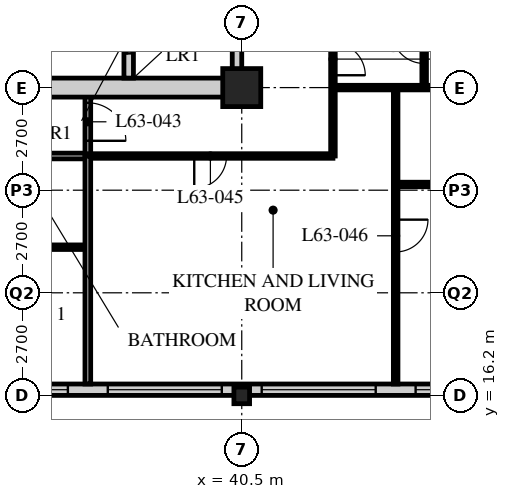
"""IFC4 building model, lengths in metres.
Left out: names, types, materials, properties, quantities, classifications, styles, units other than length and angle.
Written with IfcOpenShell. Run it as: python <this file> out.ifc"""

import sys

from ifc_helpers import new_model, si_unit, direction, frame, frame_2d, origin, origin_2d, place, context, subcontext, project, spatial, rectangle, hollow_rectangle, i_section, extrude, element, fill, save


model = new_model("IFC4")
c1 = context("Model", 3, precision=1e-05, world=origin(), true_north=direction((0.0, 1.0)))
c2 = subcontext(c1, "Body", "Model", "MODEL_VIEW")
j1 = project(units=[si_unit("LENGTHUNIT", "METRE"), si_unit("PLANEANGLEUNIT", "RADIAN")], contexts=[c1])
p1 = place(None, origin())
s1 = spatial("IfcSite", under=j1, at=p1, CompositionType="ELEMENT")
p2 = place(p1, origin())
s2 = spatial("IfcBuilding", under=s1, at=p2, CompositionType="ELEMENT")
p3 = place(p2, frame((0.0, 0.0, 246.3)))
s3 = spatial("IfcBuildingStorey", under=s2, at=p3, CompositionType="ELEMENT", Elevation=246.3)
p4 = place(p3, frame((40.5, 16.2, 0.0), z_axis=(0.0, 0.0, 1.0), x_axis=(1.0, 0.0, 0.0)))
e1 = element("IfcColumn", 1, at=p4, inside=s3, PredefinedType="COLUMN", context=c2, shape_type="SweptSolid", body=[
    extrude(i_section(OverallWidth=0.412, OverallDepth=0.437, WebThickness=0.036, FlangeThickness=0.058, FilletRadius=0.015, at=origin_2d()), origin(), (0.0, 0.0, 1.0), 3.9),
])
p5 = place(p3, frame((40.5, 24.3, 0.0), z_axis=(0.0, 0.0, 1.0), x_axis=(1.0, 0.0, 0.0)))
e2 = element("IfcColumn", 2, at=p5, inside=s3, PredefinedType="COLUMN", context=c2, shape_type="SweptSolid", body=[
    extrude(hollow_rectangle(XDim=1.0, YDim=1.0, WallThickness=0.1, at=origin_2d()), origin(), (0.0, 0.0, 1.0), 3.9),
])
p6 = place(p3, frame((8.4, 16.35, 0.0), z_axis=(0.0, 0.0, 1.0), x_axis=(1.0, 0.0, 0.0)))
e3 = element("IfcWall", 3, at=p6, inside=s3, PredefinedType="SOLIDWALL", context=c2, shape_type="SweptSolid", body=[
    extrude(rectangle(XDim=40.2, YDim=0.3, at=frame_2d((20.1, 0.0))), origin(), (0.0, 0.0, 1.0), 3.69),
])
p7 = place(p6, frame((0.225, 0.0, 0.6)))
e4 = element("IfcOpeningElement", 4, at=p7, cuts=e3, PredefinedType="OPENING", context=c2, shape_type="SweptSolid", body=[
    extrude(rectangle(XDim=3.0, YDim=2.4, at=frame_2d((1.5, 1.2))), frame((0.0, 0.16, 0.0), z_axis=(0.0, -1.0, 0.0), x_axis=(1.0, 0.0, 0.0)), (0.0, 0.0, 1.0), 0.32),
])
p8 = place(p6, frame((4.275, 0.0, 0.6)))
e5 = element("IfcOpeningElement", 5, at=p8, cuts=e3, PredefinedType="OPENING", context=c2, shape_type="SweptSolid", body=[
    extrude(rectangle(XDim=3.0, YDim=2.4, at=frame_2d((1.5, 1.2))), frame((0.0, 0.16, 0.0), z_axis=(0.0, -1.0, 0.0), x_axis=(1.0, 0.0, 0.0)), (0.0, 0.0, 1.0), 0.32),
])
p9 = place(p6, frame((8.325, 0.0, 0.6)))
e6 = element("IfcOpeningElement", 6, at=p9, cuts=e3, PredefinedType="OPENING", context=c2, shape_type="SweptSolid", body=[
    extrude(rectangle(XDim=3.0, YDim=2.4, at=frame_2d((1.5, 1.2))), frame((0.0, 0.16, 0.0), z_axis=(0.0, -1.0, 0.0), x_axis=(1.0, 0.0, 0.0)), (0.0, 0.0, 1.0), 0.32),
])
p10 = place(p6, frame((12.375, 0.0, 0.6)))
e7 = element("IfcOpeningElement", 7, at=p10, cuts=e3, PredefinedType="OPENING", context=c2, shape_type="SweptSolid", body=[
    extrude(rectangle(XDim=3.0, YDim=2.4, at=frame_2d((1.5, 1.2))), frame((0.0, 0.16, 0.0), z_axis=(0.0, -1.0, 0.0), x_axis=(1.0, 0.0, 0.0)), (0.0, 0.0, 1.0), 0.32),
])
p11 = place(p6, frame((16.425, 0.0, 0.6)))
e8 = element("IfcOpeningElement", 8, at=p11, cuts=e3, PredefinedType="OPENING", context=c2, shape_type="SweptSolid", body=[
    extrude(rectangle(XDim=3.0, YDim=2.4, at=frame_2d((1.5, 1.2))), frame((0.0, 0.16, 0.0), z_axis=(0.0, -1.0, 0.0), x_axis=(1.0, 0.0, 0.0)), (0.0, 0.0, 1.0), 0.32),
])
p12 = place(p6, frame((20.475, 0.0, 0.6)))
e9 = element("IfcOpeningElement", 9, at=p12, cuts=e3, PredefinedType="OPENING", context=c2, shape_type="SweptSolid", body=[
    extrude(rectangle(XDim=3.0, YDim=2.4, at=frame_2d((1.5, 1.2))), frame((0.0, 0.16, 0.0), z_axis=(0.0, -1.0, 0.0), x_axis=(1.0, 0.0, 0.0)), (0.0, 0.0, 1.0), 0.32),
])
p13 = place(p6, frame((24.525, 0.0, 0.6)))
e10 = element("IfcOpeningElement", 10, at=p13, cuts=e3, PredefinedType="OPENING", context=c2, shape_type="SweptSolid", body=[
    extrude(rectangle(XDim=3.0, YDim=2.4, at=frame_2d((1.5, 1.2))), frame((0.0, 0.16, 0.0), z_axis=(0.0, -1.0, 0.0), x_axis=(1.0, 0.0, 0.0)), (0.0, 0.0, 1.0), 0.32),
])
p14 = place(p6, frame((28.575, 0.0, 0.6)))
e11 = element("IfcOpeningElement", 11, at=p14, cuts=e3, PredefinedType="OPENING", context=c2, shape_type="SweptSolid", body=[
    extrude(rectangle(XDim=3.0, YDim=2.4, at=frame_2d((1.5, 1.2))), frame((0.0, 0.16, 0.0), z_axis=(0.0, -1.0, 0.0), x_axis=(1.0, 0.0, 0.0)), (0.0, 0.0, 1.0), 0.32),
])
p15 = place(p6, frame((32.625, 0.0, 0.6)))
e12 = element("IfcOpeningElement", 12, at=p15, cuts=e3, PredefinedType="OPENING", context=c2, shape_type="SweptSolid", body=[
    extrude(rectangle(XDim=3.0, YDim=2.4, at=frame_2d((1.5, 1.2))), frame((0.0, 0.16, 0.0), z_axis=(0.0, -1.0, 0.0), x_axis=(1.0, 0.0, 0.0)), (0.0, 0.0, 1.0), 0.32),
])
p16 = place(p6, frame((36.675, 0.0, 0.6)))
e13 = element("IfcOpeningElement", 13, at=p16, cuts=e3, PredefinedType="OPENING", context=c2, shape_type="SweptSolid", body=[
    extrude(rectangle(XDim=3.0, YDim=2.4, at=frame_2d((1.5, 1.2))), frame((0.0, 0.16, 0.0), z_axis=(0.0, -1.0, 0.0), x_axis=(1.0, 0.0, 0.0)), (0.0, 0.0, 1.0), 0.32),
])
p17 = place(p3, frame((12.15, 22.5, 0.0), z_axis=(0.0, 0.0, 1.0), x_axis=(1.0, 0.0, 0.0)))
e14 = element("IfcWall", 14, at=p17, inside=s3, PredefinedType="PARTITIONING", context=c2, shape_type="SweptSolid", body=[
    extrude(rectangle(XDim=24.3, YDim=0.15, at=frame_2d((12.15, 0.0))), origin(), (0.0, 0.0, 1.0), 3.69),
])
p18 = place(p17, frame((6.4, 0.0, 0.0)))
e15 = element("IfcOpeningElement", 15, at=p18, cuts=e14, PredefinedType="OPENING", context=c2, shape_type="SweptSolid", body=[
    extrude(rectangle(XDim=1.0, YDim=2.1, at=frame_2d((0.5, 1.05))), frame((0.0, 0.085, 0.0), z_axis=(0.0, -1.0, 0.0), x_axis=(1.0, 0.0, 0.0)), (0.0, 0.0, 1.0), 0.17),
])
p19 = place(p17, frame((8.5, 0.0, 0.0)))
e16 = element("IfcOpeningElement", 16, at=p19, cuts=e14, PredefinedType="OPENING", context=c2, shape_type="SweptSolid", body=[
    extrude(rectangle(XDim=1.0, YDim=2.1, at=frame_2d((0.5, 1.05))), frame((0.0, 0.085, 0.0), z_axis=(0.0, -1.0, 0.0), x_axis=(1.0, 0.0, 0.0)), (0.0, 0.0, 1.0), 0.17),
])
p20 = place(p17, frame((16.6, 0.0, 0.0)))
e17 = element("IfcOpeningElement", 17, at=p20, cuts=e14, PredefinedType="OPENING", context=c2, shape_type="SweptSolid", body=[
    extrude(rectangle(XDim=1.0, YDim=2.1, at=frame_2d((0.5, 1.05))), frame((0.0, 0.085, 0.0), z_axis=(0.0, -1.0, 0.0), x_axis=(1.0, 0.0, 0.0)), (0.0, 0.0, 1.0), 0.17),
])
p21 = place(p17, frame((2.625, 0.0, 0.0)))
e18 = element("IfcOpeningElement", 18, at=p21, cuts=e14, PredefinedType="OPENING", context=c2, shape_type="SweptSolid", body=[
    extrude(rectangle(XDim=1.0, YDim=2.1, at=frame_2d((0.5, 1.05))), frame((0.0, 0.085, 0.0), z_axis=(0.0, -1.0, 0.0), x_axis=(1.0, 0.0, 0.0)), (0.0, 0.0, 1.0), 0.17),
])
p22 = place(p3, frame((36.45, 22.5, 0.0), z_axis=(0.0, 0.0, 1.0), x_axis=(0.0, 1.0, 0.0)))
e19 = element("IfcWall", 19, at=p22, inside=s3, PredefinedType="PARTITIONING", context=c2, shape_type="SweptSolid", body=[
    extrude(rectangle(XDim=1.8, YDim=0.15, at=frame_2d((0.9, 0.0))), origin(), (0.0, 0.0, 1.0), 3.69),
])
p23 = place(p22, frame((0.4, 0.0, 0.0)))
e20 = element("IfcOpeningElement", 20, at=p23, cuts=e19, PredefinedType="OPENING", context=c2, shape_type="SweptSolid", body=[
    extrude(rectangle(XDim=1.0, YDim=2.1, at=frame_2d((0.5, 1.05))), frame((0.0, 0.085, 0.0), z_axis=(0.0, -1.0, 0.0), x_axis=(1.0, 0.0, 0.0)), (0.0, 0.0, 1.0), 0.17),
])
p24 = place(p3, frame((20.25, 20.1, 0.0), z_axis=(0.0, 0.0, 1.0), x_axis=(1.0, 0.0, 0.0)))
e21 = element("IfcWall", 21, at=p24, inside=s3, PredefinedType="PARTITIONING", context=c2, shape_type="SweptSolid", body=[
    extrude(rectangle(XDim=16.2, YDim=0.12, at=frame_2d((8.1, 0.0))), origin(), (0.0, 0.0, 1.0), 3.69),
])
p25 = place(p24, frame((0.975, 0.0, 0.0)))
e22 = element("IfcOpeningElement", 22, at=p25, cuts=e21, PredefinedType="OPENING", context=c2, shape_type="SweptSolid", body=[
    extrude(rectangle(XDim=0.85, YDim=2.1, at=frame_2d((0.425, 1.05))), frame((0.0, 0.07, 0.0), z_axis=(0.0, -1.0, 0.0), x_axis=(1.0, 0.0, 0.0)), (0.0, 0.0, 1.0), 0.14),
])
p26 = place(p24, frame((4.375, 0.0, 0.0)))
e23 = element("IfcOpeningElement", 23, at=p26, cuts=e21, PredefinedType="OPENING", context=c2, shape_type="SweptSolid", body=[
    extrude(rectangle(XDim=0.85, YDim=2.1, at=frame_2d((0.425, 1.05))), frame((0.0, 0.07, 0.0), z_axis=(0.0, -1.0, 0.0), x_axis=(1.0, 0.0, 0.0)), (0.0, 0.0, 1.0), 0.14),
])
p27 = place(p24, frame((9.075, 0.0, 0.0)))
e24 = element("IfcOpeningElement", 24, at=p27, cuts=e21, PredefinedType="OPENING", context=c2, shape_type="SweptSolid", body=[
    extrude(rectangle(XDim=0.85, YDim=2.1, at=frame_2d((0.425, 1.05))), frame((0.0, 0.07, 0.0), z_axis=(0.0, -1.0, 0.0), x_axis=(1.0, 0.0, 0.0)), (0.0, 0.0, 1.0), 0.14),
])
p28 = place(p24, frame((12.475, 0.0, 0.0)))
e25 = element("IfcOpeningElement", 25, at=p28, cuts=e21, PredefinedType="OPENING", context=c2, shape_type="SweptSolid", body=[
    extrude(rectangle(XDim=0.85, YDim=2.1, at=frame_2d((0.425, 1.05))), frame((0.0, 0.07, 0.0), z_axis=(0.0, -1.0, 0.0), x_axis=(1.0, 0.0, 0.0)), (0.0, 0.0, 1.0), 0.14),
])
p29 = place(p3, frame((42.9, 22.5, 0.0), z_axis=(0.0, 0.0, 1.0), x_axis=(0.0, 1.0, 0.0)))
e26 = element("IfcWall", 26, at=p29, inside=s3, PredefinedType="PARTITIONING", context=c2, shape_type="SweptSolid", body=[
    extrude(rectangle(XDim=13.95, YDim=0.12, at=frame_2d((6.975, 0.0))), origin(), (0.0, 0.0, 1.0), 3.69),
])
p30 = place(p29, frame((2.125, 0.0, 0.0)))
e27 = element("IfcOpeningElement", 27, at=p30, cuts=e26, PredefinedType="OPENING", context=c2, shape_type="SweptSolid", body=[
    extrude(rectangle(XDim=0.85, YDim=2.1, at=frame_2d((0.425, 1.05))), frame((0.0, 0.07, 0.0), z_axis=(0.0, -1.0, 0.0), x_axis=(1.0, 0.0, 0.0)), (0.0, 0.0, 1.0), 0.14),
])
p31 = place(p29, frame((6.175, 0.0, 0.0)))
e28 = element("IfcOpeningElement", 28, at=p31, cuts=e26, PredefinedType="OPENING", context=c2, shape_type="SweptSolid", body=[
    extrude(rectangle(XDim=0.85, YDim=2.1, at=frame_2d((0.425, 1.05))), frame((0.0, 0.07, 0.0), z_axis=(0.0, -1.0, 0.0), x_axis=(1.0, 0.0, 0.0)), (0.0, 0.0, 1.0), 0.14),
])
p32 = place(p29, frame((10.225, 0.0, 0.0)))
e29 = element("IfcOpeningElement", 29, at=p32, cuts=e26, PredefinedType="OPENING", context=c2, shape_type="SweptSolid", body=[
    extrude(rectangle(XDim=0.85, YDim=2.1, at=frame_2d((0.425, 1.05))), frame((0.0, 0.07, 0.0), z_axis=(0.0, -1.0, 0.0), x_axis=(1.0, 0.0, 0.0)), (0.0, 0.0, 1.0), 0.14),
])
p33 = place(p3, frame((36.45, 22.5, 0.0), z_axis=(0.0, 0.0, 1.0), x_axis=(1.0, 0.0, 0.0)))
e30 = element("IfcWall", 30, at=p33, inside=s3, PredefinedType="PARTITIONING", context=c2, shape_type="SweptSolid", body=[
    extrude(rectangle(XDim=6.45, YDim=0.12, at=frame_2d((3.225, 0.0))), origin(), (0.0, 0.0, 1.0), 3.69),
])
p34 = place(p33, frame((2.8, 0.0, 0.0)))
e31 = element("IfcOpeningElement", 31, at=p34, cuts=e30, PredefinedType="OPENING", context=c2, shape_type="SweptSolid", body=[
    extrude(rectangle(XDim=0.85, YDim=2.1, at=frame_2d((0.425, 1.05))), frame((0.0, 0.07, 0.0), z_axis=(0.0, -1.0, 0.0), x_axis=(1.0, 0.0, 0.0)), (0.0, 0.0, 1.0), 0.14),
])
p35 = place(p3, frame((42.9, 24.3, 0.0), z_axis=(0.0, 0.0, 1.0), x_axis=(1.0, 0.0, 0.0)))
e32 = element("IfcWall", 32, at=p35, inside=s3, PredefinedType="PARTITIONING", context=c2, shape_type="SweptSolid", body=[
    extrude(rectangle(XDim=9.45, YDim=0.12, at=frame_2d((4.725, 0.0))), origin(), (0.0, 0.0, 1.0), 3.078),
])
p36 = place(p3, frame((36.45, 16.5, 0.0), z_axis=(0.0, 0.0, 1.0), x_axis=(0.0, 1.0, 0.0)))
e33 = element("IfcWall", 33, at=p36, inside=s3, PredefinedType="PARTITIONING", context=c2, shape_type="SweptSolid", body=[
    extrude(rectangle(XDim=6.0, YDim=0.15, at=frame_2d((3.0, 0.0))), origin(), (0.0, 0.0, 1.0), 3.69),
])
p37 = place(p3, frame((44.55, 16.5, 0.0), z_axis=(0.0, 0.0, 1.0), x_axis=(0.0, 1.0, 0.0)))
e34 = element("IfcWall", 34, at=p37, inside=s3, PredefinedType="PARTITIONING", context=c2, shape_type="SweptSolid", body=[
    extrude(rectangle(XDim=7.8, YDim=0.12, at=frame_2d((3.9, 0.0))), origin(), (0.0, 0.0, 1.0), 3.69),
])
p38 = place(p37, frame((3.475, 0.0, 0.0)))
e35 = element("IfcOpeningElement", 35, at=p38, cuts=e34, PredefinedType="OPENING", context=c2, shape_type="SweptSolid", body=[
    extrude(rectangle(XDim=0.85, YDim=2.1, at=frame_2d((0.425, 1.05))), frame((0.0, 0.07, 0.0), z_axis=(0.0, -1.0, 0.0), x_axis=(1.0, 0.0, 0.0)), (0.0, 0.0, 1.0), 0.14),
])
p39 = place(p3, frame((45.3, 24.3, 0.0), z_axis=(0.0, 0.0, 1.0), x_axis=(0.0, 1.0, 0.0)))
e36 = element("IfcWall", 36, at=p39, inside=s3, PredefinedType="PARTITIONING", context=c2, shape_type="SweptSolid", body=[
    extrude(rectangle(XDim=1.76, YDim=0.12, at=frame_2d((0.88, 0.0))), origin(), (0.0, 0.0, 1.0), 3.69),
])
p40 = place(p39, frame((0.635, 0.0, 0.0)))
e37 = element("IfcOpeningElement", 37, at=p40, cuts=e36, PredefinedType="OPENING", context=c2, shape_type="SweptSolid", body=[
    extrude(rectangle(XDim=0.85, YDim=2.1, at=frame_2d((0.425, 1.05))), frame((0.0, 0.07, 0.0), z_axis=(0.0, -1.0, 0.0), x_axis=(1.0, 0.0, 0.0)), (0.0, 0.0, 1.0), 0.14),
])
p41 = place(p3, frame((44.55, 21.75, 0.0), z_axis=(0.0, 0.0, 1.0), x_axis=(1.0, 0.0, 0.0)))
e38 = element("IfcWall", 38, at=p41, inside=s3, PredefinedType="PARTITIONING", context=c2, shape_type="SweptSolid", body=[
    extrude(rectangle(XDim=7.8, YDim=0.12, at=frame_2d((3.9, 0.0))), origin(), (0.0, 0.0, 1.0), 3.69),
])
p42 = place(p41, frame((3.475, 0.0, 0.0)))
e39 = element("IfcOpeningElement", 39, at=p42, cuts=e38, PredefinedType="OPENING", context=c2, shape_type="SweptSolid", body=[
    extrude(rectangle(XDim=0.85, YDim=2.1, at=frame_2d((0.425, 1.05))), frame((0.0, 0.07, 0.0), z_axis=(0.0, -1.0, 0.0), x_axis=(1.0, 0.0, 0.0)), (0.0, 0.0, 1.0), 0.14),
])
p43 = place(p3, frame((15.95, 24.3, 0.0), z_axis=(0.0, 0.0, 1.0), x_axis=(1.0, 0.0, 0.0)))
e40 = element("IfcWall", 40, at=p43, inside=s3, PredefinedType="SOLIDWALL", context=c2, shape_type="SweptSolid", body=[
    extrude(rectangle(XDim=24.55, YDim=0.5, at=frame_2d((12.275, 0.0))), origin(), (0.0, 0.0, 1.0), 3.04),
])
p44 = place(p43, frame((11.5, 0.0, 0.0)))
e41 = element("IfcOpeningElement", 41, at=p44, cuts=e40, PredefinedType="OPENING", context=c2, shape_type="SweptSolid", body=[
    extrude(rectangle(XDim=1.8, YDim=2.4, at=frame_2d((0.9, 1.2))), frame((0.0, 0.26, 0.0), z_axis=(0.0, -1.0, 0.0), x_axis=(1.0, 0.0, 0.0)), (0.0, 0.0, 1.0), 0.52),
])
p45 = place(p3, frame((40.375, 24.55, 0.0), z_axis=(0.0, 0.0, 1.0), x_axis=(0.0, 1.0, 0.0)))
e42 = element("IfcWall", 42, at=p45, inside=s3, PredefinedType="SOLIDWALL", context=c2, shape_type="SweptSolid", body=[
    extrude(rectangle(XDim=15.7, YDim=0.25, at=frame_2d((7.85, 0.0))), origin(), (0.0, 0.0, 1.0), 3.078),
])
p46 = place(p3, frame((37.525, 24.55, 0.0), z_axis=(0.0, 0.0, 1.0), x_axis=(0.0, 1.0, 0.0)))
e43 = element("IfcWall", 43, at=p46, inside=s3, PredefinedType="SOLIDWALL", context=c2, shape_type="SweptSolid", body=[
    extrude(rectangle(XDim=7.75, YDim=0.25, at=frame_2d((3.875, 0.0))), origin(), (0.0, 0.0, 1.0), 3.69),
])
p47 = place(p46, frame((0.65, 0.0, 0.0)))
e44 = element("IfcOpeningElement", 44, at=p47, cuts=e43, PredefinedType="OPENING", context=c2, shape_type="SweptSolid", body=[
    extrude(rectangle(XDim=1.1, YDim=2.4, at=frame_2d((0.55, 1.2))), frame((0.0, 0.135, 0.0), z_axis=(0.0, -1.0, 0.0), x_axis=(1.0, 0.0, 0.0)), (0.0, 0.0, 1.0), 0.27),
])
p48 = place(p46, frame((3.25, 0.0, 0.0)))
e45 = element("IfcOpeningElement", 45, at=p48, cuts=e43, PredefinedType="OPENING", context=c2, shape_type="SweptSolid", body=[
    extrude(rectangle(XDim=1.1, YDim=2.4, at=frame_2d((0.55, 1.2))), frame((0.0, 0.135, 0.0), z_axis=(0.0, -1.0, 0.0), x_axis=(1.0, 0.0, 0.0)), (0.0, 0.0, 1.0), 0.27),
])
p49 = place(p46, frame((5.85, 0.0, 0.0)))
e46 = element("IfcOpeningElement", 46, at=p49, cuts=e43, PredefinedType="OPENING", context=c2, shape_type="SweptSolid", body=[
    extrude(rectangle(XDim=1.1, YDim=2.4, at=frame_2d((0.55, 1.2))), frame((0.0, 0.135, 0.0), z_axis=(0.0, -1.0, 0.0), x_axis=(1.0, 0.0, 0.0)), (0.0, 0.0, 1.0), 0.27),
])
p50 = place(p13, origin())
e47 = element("IfcWindow", 47, at=p50, inside=s3, PartitioningType="SINGLE_PANEL", PredefinedType="WINDOW", context=c2, shape_type="SweptSolid", body=[
    extrude(rectangle(XDim=3.0, YDim=2.4, at=frame_2d((1.5, 1.2))), frame((0.0, 0.03, 0.0), z_axis=(0.0, -1.0, 0.0), x_axis=(1.0, 0.0, 0.0)), (0.0, 0.0, 1.0), 0.06),
])
fill(e10, e47)
p51 = place(p14, origin())
e48 = element("IfcWindow", 48, at=p51, inside=s3, PartitioningType="SINGLE_PANEL", PredefinedType="WINDOW", context=c2, shape_type="SweptSolid", body=[
    extrude(rectangle(XDim=3.0, YDim=2.4, at=frame_2d((1.5, 1.2))), frame((0.0, 0.03, 0.0), z_axis=(0.0, -1.0, 0.0), x_axis=(1.0, 0.0, 0.0)), (0.0, 0.0, 1.0), 0.06),
])
fill(e11, e48)
p52 = place(p15, origin())
e49 = element("IfcWindow", 49, at=p52, inside=s3, PartitioningType="SINGLE_PANEL", PredefinedType="WINDOW", context=c2, shape_type="SweptSolid", body=[
    extrude(rectangle(XDim=3.0, YDim=2.4, at=frame_2d((1.5, 1.2))), frame((0.0, 0.03, 0.0), z_axis=(0.0, -1.0, 0.0), x_axis=(1.0, 0.0, 0.0)), (0.0, 0.0, 1.0), 0.06),
])
fill(e12, e49)
p53 = place(p16, origin())
e50 = element("IfcWindow", 50, at=p53, inside=s3, PartitioningType="SINGLE_PANEL", PredefinedType="WINDOW", context=c2, shape_type="SweptSolid", body=[
    extrude(rectangle(XDim=3.0, YDim=2.4, at=frame_2d((1.5, 1.2))), frame((0.0, 0.03, 0.0), z_axis=(0.0, -1.0, 0.0), x_axis=(1.0, 0.0, 0.0)), (0.0, 0.0, 1.0), 0.06),
])
fill(e13, e50)
p54 = place(p23, origin())
e51 = element("IfcDoor", 51, at=p54, inside=s3, OperationType="SINGLE_SWING_RIGHT", PredefinedType="DOOR", context=c2, shape_type="SweptSolid", body=[
    extrude(rectangle(XDim=1.0, YDim=2.1, at=frame_2d((0.5, 1.05))), frame((0.0, 0.025, 0.0), z_axis=(0.0, -1.0, 0.0), x_axis=(1.0, 0.0, 0.0)), (0.0, 0.0, 1.0), 0.05),
])
fill(e20, e51)
p55 = place(p34, origin())
e52 = element("IfcDoor", 52, at=p55, inside=s3, OperationType="SINGLE_SWING_RIGHT", PredefinedType="DOOR", context=c2, shape_type="SweptSolid", body=[
    extrude(rectangle(XDim=0.85, YDim=2.1, at=frame_2d((0.425, 1.05))), frame((0.0, 0.025, 0.0), z_axis=(0.0, -1.0, 0.0), x_axis=(1.0, 0.0, 0.0)), (0.0, 0.0, 1.0), 0.05),
])
fill(e31, e52)
p56 = place(p38, origin())
e53 = element("IfcDoor", 53, at=p56, inside=s3, OperationType="SINGLE_SWING_LEFT", PredefinedType="DOOR", context=c2, shape_type="SweptSolid", body=[
    extrude(rectangle(XDim=0.85, YDim=2.1, at=frame_2d((0.425, 1.05))), frame((0.0, 0.025, 0.0), z_axis=(0.0, -1.0, 0.0), x_axis=(1.0, 0.0, 0.0)), (0.0, 0.0, 1.0), 0.05),
])
fill(e35, e53)
p57 = place(p30, origin())
e54 = element("IfcDoor", 54, at=p57, inside=s3, OperationType="SINGLE_SWING_RIGHT", PredefinedType="DOOR", context=c2, shape_type="SweptSolid", body=[
    extrude(rectangle(XDim=0.85, YDim=2.1, at=frame_2d((0.425, 1.05))), frame((0.0, 0.025, 0.0), z_axis=(0.0, -1.0, 0.0), x_axis=(1.0, 0.0, 0.0)), (0.0, 0.0, 1.0), 0.05),
])
fill(e27, e54)
p58 = place(p40, origin())
e55 = element("IfcDoor", 55, at=p58, inside=s3, OperationType="SINGLE_SWING_RIGHT", PredefinedType="DOOR", context=c2, shape_type="SweptSolid", body=[
    extrude(rectangle(XDim=0.85, YDim=2.1, at=frame_2d((0.425, 1.05))), frame((0.0, 0.025, 0.0), z_axis=(0.0, -1.0, 0.0), x_axis=(1.0, 0.0, 0.0)), (0.0, 0.0, 1.0), 0.05),
])
fill(e37, e55)
p59 = place(p47, origin())
e56 = element("IfcDoor", 56, at=p59, inside=s3, OperationType="DOUBLE_DOOR_SLIDING", PredefinedType="DOOR", context=c2, shape_type="SweptSolid", body=[
    extrude(rectangle(XDim=1.1, YDim=2.4, at=frame_2d((0.55, 1.2))), frame((0.0, 0.025, 0.0), z_axis=(0.0, -1.0, 0.0), x_axis=(1.0, 0.0, 0.0)), (0.0, 0.0, 1.0), 0.05),
])
fill(e44, e56)
save(model, sys.argv[1])
